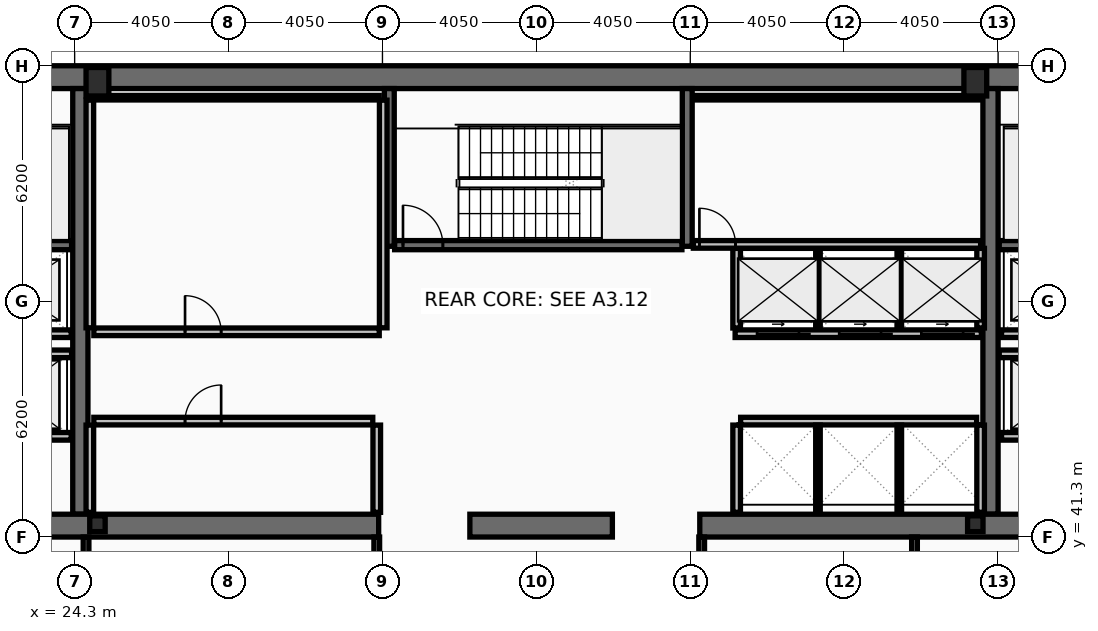
"""IFC4 building model, lengths in metres.
Left out: names, types, materials, properties, quantities, classifications, styles, units other than length and angle.
Written with IfcOpenShell. Run it as: python <this file> out.ifc"""

import sys

from ifc_helpers import new_model, si_unit, direction, frame, frame_2d, origin, origin_2d, place, context, subcontext, project, spatial, rectangle, hollow_rectangle, i_section, extrude, element, fill, save


model = new_model("IFC4")
c1 = context("Model", 3, precision=1e-05, world=origin(), true_north=direction((0.0, 1.0)))
c2 = subcontext(c1, "Body", "Model", "MODEL_VIEW")
j1 = project(units=[si_unit("LENGTHUNIT", "METRE"), si_unit("PLANEANGLEUNIT", "RADIAN")], contexts=[c1])
p1 = place(None, origin())
s1 = spatial("IfcSite", under=j1, at=p1, CompositionType="ELEMENT")
p2 = place(p1, origin())
s2 = spatial("IfcBuilding", under=s1, at=p2, CompositionType="ELEMENT")
p3 = place(p2, frame((0.0, 0.0, 257.0)))
s3 = spatial("IfcBuildingStorey", under=s2, at=p3, CompositionType="ELEMENT", Elevation=257.0)
p4 = place(p3, frame((16.2, 53.4, 0.0), z_axis=(0.0, 0.0, 1.0), x_axis=(1.0, 0.0, 0.0)))
e1 = element("IfcWall", 1, at=p4, inside=s3, PredefinedType="SHEAR", context=c2, shape_type="SweptSolid", body=[
    extrude(rectangle(XDim=40.5, YDim=0.6, at=frame_2d((20.25, 0.0))), origin(), (0.0, 0.0, 1.0), 4.64),
])
for number, where, z_axis, x_axis in (
    (2, (24.45, 41.9, 0.0), (0.0, 0.0, 1.0), (0.0, 1.0, 0.0)),
    (3, (48.4, 41.9, 0.0), (0.0, 0.0, 1.0), (0.0, 1.0, 0.0)),
):
    element("IfcWall", number, at=place(p3, frame(where, z_axis=z_axis, x_axis=x_axis)), inside=s3, PredefinedType="SHEAR", context=c2, shape_type="SweptSolid", body=[
        extrude(rectangle(XDim=11.2, YDim=0.4, at=frame_2d((5.6, 0.0))), origin(), (0.0, 0.0, 1.0), 4.64),
    ])
p5 = place(p3, frame((32.3, 41.6, 0.0), z_axis=(0.0, 0.0, 1.0), x_axis=(-1.0, 0.0, 0.0)))
e4 = element("IfcWall", 4, at=p5, inside=s3, PredefinedType="SHEAR", context=c2, shape_type="SweptSolid", body=[
    extrude(rectangle(XDim=11.45, YDim=0.6, at=frame_2d((5.725, 0.0))), origin(), (0.0, 0.0, 1.0), 4.64),
])
p6 = place(p3, frame((38.45, 41.6, 0.0), z_axis=(0.0, 0.0, 1.0), x_axis=(-1.0, 0.0, 0.0)))
e5 = element("IfcWall", 5, at=p6, inside=s3, PredefinedType="SHEAR", context=c2, shape_type="SweptSolid", body=[
    extrude(rectangle(XDim=3.75, YDim=0.6, at=frame_2d((1.875, 0.0))), origin(), (0.0, 0.0, 1.0), 4.64),
])
p7 = place(p3, frame((52.05, 41.6, 0.0), z_axis=(0.0, 0.0, 1.0), x_axis=(-1.0, 0.0, 0.0)))
e6 = element("IfcWall", 6, at=p7, inside=s3, PredefinedType="SHEAR", context=c2, shape_type="SweptSolid", body=[
    extrude(rectangle(XDim=11.3, YDim=0.6, at=frame_2d((5.65, 0.0))), origin(), (0.0, 0.0, 1.0), 4.64),
])
for number, where, z_axis, x_axis in (
    (7, (32.58, 48.95, 0.0), (0.0, 0.0, 1.0), (0.0, 1.0, 0.0)),
    (8, (40.42, 48.95, 0.0), (0.0, 0.0, 1.0), (0.0, 1.0, 0.0)),
):
    element("IfcWall", number, at=place(p3, frame(where, z_axis=z_axis, x_axis=x_axis)), inside=s3, PredefinedType="SHEAR", context=c2, shape_type="SweptSolid", body=[
        extrude(rectangle(XDim=4.15, YDim=0.26, at=frame_2d((2.075, 0.0))), origin(), (0.0, 0.0, 1.0), 4.64),
    ])
p8 = place(p3, frame((16.8, 48.98, 0.0), z_axis=(0.0, 0.0, 1.0), x_axis=(1.0, 0.0, 0.0)))
e9 = element("IfcWall", 9, at=p8, inside=s3, PredefinedType="SHEAR", context=c2, shape_type="SweptSolid", body=[
    extrude(rectangle(XDim=7.42, YDim=0.24, at=frame_2d((3.71, 0.0))), origin(), (0.0, 0.0, 1.0), 4.64),
])
p9 = place(p8, frame((0.22, 0.0, 0.0)))
e10 = element("IfcOpeningElement", 10, at=p9, cuts=e9, PredefinedType="OPENING", context=c2, shape_type="SweptSolid", body=[
    extrude(rectangle(XDim=1.05, YDim=2.15, at=frame_2d((0.525, 1.075))), frame((0.0, 0.13, 0.0), z_axis=(0.0, -1.0, 0.0), x_axis=(1.0, 0.0, 0.0)), (0.0, 0.0, 1.0), 0.26),
])
p10 = place(p3, frame((48.63, 48.98, 0.0), z_axis=(0.0, 0.0, 1.0), x_axis=(1.0, 0.0, 0.0)))
e11 = element("IfcWall", 11, at=p10, inside=s3, PredefinedType="SHEAR", context=c2, shape_type="SweptSolid", body=[
    extrude(rectangle(XDim=7.47, YDim=0.24, at=frame_2d((3.735, 0.0))), origin(), (0.0, 0.0, 1.0), 4.64),
])
p11 = place(p10, frame((6.2, 0.0, 0.0)))
e12 = element("IfcOpeningElement", 12, at=p11, cuts=e11, PredefinedType="OPENING", context=c2, shape_type="SweptSolid", body=[
    extrude(rectangle(XDim=1.05, YDim=2.15, at=frame_2d((0.525, 1.075))), frame((0.0, 0.13, 0.0), z_axis=(0.0, -1.0, 0.0), x_axis=(1.0, 0.0, 0.0)), (0.0, 0.0, 1.0), 0.26),
])
p12 = place(p3, frame((32.72, 48.98, 0.0), z_axis=(0.0, 0.0, 1.0), x_axis=(1.0, 0.0, 0.0)))
e13 = element("IfcWall", 13, at=p12, inside=s3, PredefinedType="SHEAR", context=c2, shape_type="SweptSolid", body=[
    extrude(rectangle(XDim=7.56, YDim=0.24, at=frame_2d((3.78, 0.0))), origin(), (0.0, 0.0, 1.0), 4.64),
])
p13 = place(p12, frame((0.22, 0.0, 0.0)))
e14 = element("IfcOpeningElement", 14, at=p13, cuts=e13, PredefinedType="OPENING", context=c2, shape_type="SweptSolid", body=[
    extrude(rectangle(XDim=1.05, YDim=2.15, at=frame_2d((0.525, 1.075))), frame((0.0, 0.13, 0.0), z_axis=(0.0, -1.0, 0.0), x_axis=(1.0, 0.0, 0.0)), (0.0, 0.0, 1.0), 0.26),
])
for number, where, z_axis, x_axis in (
    (15, (24.9, 53.28, 0.0), (0.0, 0.0, 1.0), (1.0, 0.0, 0.0)),
    (16, (48.0, 53.28, 0.0), (0.0, 0.0, 1.0), (1.0, 0.0, 0.0)),
):
    element("IfcColumn", number, at=place(p3, frame(where, z_axis=z_axis, x_axis=x_axis)), inside=s3, PredefinedType="COLUMN", context=c2, shape_type="SweptSolid", body=[
        extrude(hollow_rectangle(XDim=0.6, YDim=0.75, WallThickness=0.045, at=origin_2d()), origin(), (0.0, 0.0, 1.0), 4.8),
    ])
for number, where, z_axis, x_axis in (
    (17, (24.9, 41.65, 0.0), (0.0, 0.0, 1.0), (1.0, 0.0, 0.0)),
    (18, (48.0, 41.65, 0.0), (0.0, 0.0, 1.0), (1.0, 0.0, 0.0)),
):
    element("IfcColumn", number, at=place(p3, frame(where, z_axis=z_axis, x_axis=x_axis)), inside=s3, PredefinedType="COLUMN", context=c2, shape_type="SweptSolid", body=[
        extrude(i_section(OverallWidth=0.406, OverallDepth=0.416, WebThickness=0.03, FlangeThickness=0.048, at=origin_2d()), origin(), (0.0, 0.0, 1.0), 4.8),
    ])
p14 = place(p3, frame((51.61, 43.95, 0.0), z_axis=(0.0, 0.0, 1.0), x_axis=(-1.0, 0.0, 0.0)))
e19 = element("IfcWall", 19, at=p14, inside=s3, PredefinedType="PARTITIONING", context=c2, shape_type="SweptSolid", body=[
    extrude(rectangle(XDim=2.92, YDim=0.2, at=frame_2d((1.46, 0.0))), origin(), (0.0, 0.0, 1.0), 4.64),
])
p15 = place(p14, frame((0.81, 0.0, 0.0)))
e20 = element("IfcOpeningElement", 20, at=p15, cuts=e19, PredefinedType="OPENING", context=c2, shape_type="SweptSolid", body=[
    extrude(rectangle(XDim=1.3, YDim=2.18, at=frame_2d((0.65, 1.09))), frame((0.0, 0.11, 0.0), z_axis=(0.0, -1.0, 0.0), x_axis=(1.0, 0.0, 0.0)), (0.0, 0.0, 1.0), 0.22),
])
p16 = place(p3, frame((24.21, 43.95, 0.0), z_axis=(0.0, 0.0, 1.0), x_axis=(-1.0, 0.0, 0.0)))
e21 = element("IfcWall", 21, at=p16, inside=s3, PredefinedType="PARTITIONING", context=c2, shape_type="SweptSolid", body=[
    extrude(rectangle(XDim=2.97, YDim=0.2, at=frame_2d((1.485, 0.0))), origin(), (0.0, 0.0, 1.0), 4.64),
])
p17 = place(p16, frame((0.86, 0.0, 0.0)))
e22 = element("IfcOpeningElement", 22, at=p17, cuts=e21, PredefinedType="OPENING", context=c2, shape_type="SweptSolid", body=[
    extrude(rectangle(XDim=1.3, YDim=2.18, at=frame_2d((0.65, 1.09))), frame((0.0, 0.11, 0.0), z_axis=(0.0, -1.0, 0.0), x_axis=(1.0, 0.0, 0.0)), (0.0, 0.0, 1.0), 0.22),
])
p18 = place(p3, frame((51.61, 46.65, 0.0), z_axis=(0.0, 0.0, 1.0), x_axis=(-1.0, 0.0, 0.0)))
e23 = element("IfcWall", 23, at=p18, inside=s3, PredefinedType="PARTITIONING", context=c2, shape_type="SweptSolid", body=[
    extrude(rectangle(XDim=2.92, YDim=0.2, at=frame_2d((1.46, 0.0))), origin(), (0.0, 0.0, 1.0), 4.64),
])
p19 = place(p18, frame((0.86, 0.0, 0.0)))
e24 = element("IfcOpeningElement", 24, at=p19, cuts=e23, PredefinedType="OPENING", context=c2, shape_type="SweptSolid", body=[
    extrude(rectangle(XDim=1.2, YDim=2.18, at=frame_2d((0.6, 1.09))), frame((0.0, 0.11, 0.0), z_axis=(0.0, -1.0, 0.0), x_axis=(1.0, 0.0, 0.0)), (0.0, 0.0, 1.0), 0.22),
])
p20 = place(p3, frame((24.21, 46.65, 0.0), z_axis=(0.0, 0.0, 1.0), x_axis=(-1.0, 0.0, 0.0)))
e25 = element("IfcWall", 25, at=p20, inside=s3, PredefinedType="PARTITIONING", context=c2, shape_type="SweptSolid", body=[
    extrude(rectangle(XDim=2.97, YDim=0.2, at=frame_2d((1.485, 0.0))), origin(), (0.0, 0.0, 1.0), 4.64),
])
p21 = place(p20, frame((0.91, 0.0, 0.0)))
e26 = element("IfcOpeningElement", 26, at=p21, cuts=e25, PredefinedType="OPENING", context=c2, shape_type="SweptSolid", body=[
    extrude(rectangle(XDim=1.2, YDim=2.18, at=frame_2d((0.6, 1.09))), frame((0.0, 0.11, 0.0), z_axis=(0.0, -1.0, 0.0), x_axis=(1.0, 0.0, 0.0)), (0.0, 0.0, 1.0), 0.22),
])
p22 = place(p3, frame((48.16, 46.65, 0.0), z_axis=(0.0, 0.0, 1.0), x_axis=(-1.0, 0.0, 0.0)))
e27 = element("IfcWall", 27, at=p22, inside=s3, PredefinedType="PARTITIONING", context=c2, shape_type="SweptSolid", body=[
    extrude(rectangle(XDim=6.48, YDim=0.2, at=frame_2d((3.24, 0.0))), origin(), (0.0, 0.0, 1.0), 4.64),
])
p23 = place(p22, frame((4.8, 0.0, 0.0)))
e28 = element("IfcOpeningElement", 28, at=p23, cuts=e27, PredefinedType="OPENING", context=c2, shape_type="SweptSolid", body=[
    extrude(rectangle(XDim=1.1, YDim=2.18, at=frame_2d((0.55, 1.09))), frame((0.0, 0.11, 0.0), z_axis=(0.0, -1.0, 0.0), x_axis=(1.0, 0.0, 0.0)), (0.0, 0.0, 1.0), 0.22),
])
p24 = place(p22, frame((2.64, 0.0, 0.0)))
e29 = element("IfcOpeningElement", 29, at=p24, cuts=e27, PredefinedType="OPENING", context=c2, shape_type="SweptSolid", body=[
    extrude(rectangle(XDim=1.1, YDim=2.18, at=frame_2d((0.55, 1.09))), frame((0.0, 0.11, 0.0), z_axis=(0.0, -1.0, 0.0), x_axis=(1.0, 0.0, 0.0)), (0.0, 0.0, 1.0), 0.22),
])
p25 = place(p22, frame((0.48, 0.0, 0.0)))
e30 = element("IfcOpeningElement", 30, at=p25, cuts=e27, PredefinedType="OPENING", context=c2, shape_type="SweptSolid", body=[
    extrude(rectangle(XDim=1.1, YDim=2.18, at=frame_2d((0.55, 1.09))), frame((0.0, 0.11, 0.0), z_axis=(0.0, -1.0, 0.0), x_axis=(1.0, 0.0, 0.0)), (0.0, 0.0, 1.0), 0.22),
])
p26 = place(p3, frame((21.2, 46.12, 0.0), z_axis=(0.0, 0.0, 1.0), x_axis=(1.0, 0.0, 0.0)))
e31 = element("IfcWall", 31, at=p26, inside=s3, PredefinedType="PARTITIONING", context=c2, shape_type="SweptSolid", body=[
    extrude(rectangle(XDim=3.02, YDim=0.2, at=frame_2d((1.51, 0.0))), origin(), (0.0, 0.0, 1.0), 4.64),
])
p27 = place(p3, frame((48.63, 46.12, 0.0), z_axis=(0.0, 0.0, 1.0), x_axis=(1.0, 0.0, 0.0)))
e32 = element("IfcWall", 32, at=p27, inside=s3, PredefinedType="PARTITIONING", context=c2, shape_type="SweptSolid", body=[
    extrude(rectangle(XDim=3.07, YDim=0.2, at=frame_2d((1.535, 0.0))), origin(), (0.0, 0.0, 1.0), 4.64),
])
for number, where, z_axis, x_axis in (
    (33, (24.7, 46.805, 0.0), (0.0, 0.0, 1.0), (0.0, 1.0, 0.0)),
    (34, (32.42, 46.805, 0.0), (0.0, 0.0, 1.0), (0.0, 1.0, 0.0)),
):
    element("IfcWall", number, at=place(p3, frame(where, z_axis=z_axis, x_axis=x_axis)), inside=s3, PredefinedType="PARTITIONING", context=c2, shape_type="SweptSolid", body=[
        extrude(rectangle(XDim=5.99, YDim=0.2, at=frame_2d((2.995, 0.0))), origin(), (0.0, 0.0, 1.0), 4.64),
    ])
p28 = place(p3, frame((24.805, 52.86, 0.0), z_axis=(0.0, 0.0, 1.0), x_axis=(1.0, 0.0, 0.0)))
e35 = element("IfcWall", 35, at=p28, inside=s3, PredefinedType="PARTITIONING", context=c2, shape_type="SweptSolid", body=[
    extrude(rectangle(XDim=7.51, YDim=0.12, at=frame_2d((3.755, 0.0))), origin(), (0.0, 0.0, 1.0), 4.64),
])
p29 = place(p3, frame((24.805, 46.7, 0.0), z_axis=(0.0, 0.0, 1.0), x_axis=(1.0, 0.0, 0.0)))
e36 = element("IfcWall", 36, at=p29, inside=s3, PredefinedType="PARTITIONING", context=c2, shape_type="SweptSolid", body=[
    extrude(rectangle(XDim=7.51, YDim=0.2, at=frame_2d((3.755, 0.0))), origin(), (0.0, 0.0, 1.0), 4.64),
])
p30 = place(p29, frame((2.4, 0.0, 0.0)))
e37 = element("IfcOpeningElement", 37, at=p30, cuts=e36, PredefinedType="OPENING", context=c2, shape_type="SweptSolid", body=[
    extrude(rectangle(XDim=0.95, YDim=2.1, at=frame_2d((0.475, 1.05))), frame((0.0, 0.11, 0.0), z_axis=(0.0, -1.0, 0.0), x_axis=(1.0, 0.0, 0.0)), (0.0, 0.0, 1.0), 0.22),
])
for number, where, z_axis, x_axis in (
    (38, (24.7, 41.95, 0.0), (0.0, 0.0, 1.0), (0.0, 1.0, 0.0)),
    (39, (32.25, 41.95, 0.0), (0.0, 0.0, 1.0), (0.0, 1.0, 0.0)),
):
    element("IfcWall", number, at=place(p3, frame(where, z_axis=z_axis, x_axis=x_axis)), inside=s3, PredefinedType="PARTITIONING", context=c2, shape_type="SweptSolid", body=[
        extrude(rectangle(XDim=2.295, YDim=0.2, at=frame_2d((1.147, 0.0))), origin(), (0.0, 0.0, 1.0), 4.64),
    ])
p31 = place(p3, frame((24.805, 44.35, 0.0), z_axis=(0.0, 0.0, 1.0), x_axis=(1.0, 0.0, 0.0)))
e40 = element("IfcWall", 40, at=p31, inside=s3, PredefinedType="PARTITIONING", context=c2, shape_type="SweptSolid", body=[
    extrude(rectangle(XDim=7.34, YDim=0.2, at=frame_2d((3.67, 0.0))), origin(), (0.0, 0.0, 1.0), 4.64),
])
p32 = place(p31, frame((2.4, 0.0, 0.0)))
e41 = element("IfcOpeningElement", 41, at=p32, cuts=e40, PredefinedType="OPENING", context=c2, shape_type="SweptSolid", body=[
    extrude(rectangle(XDim=0.95, YDim=2.1, at=frame_2d((0.475, 1.05))), frame((0.0, 0.11, 0.0), z_axis=(0.0, -1.0, 0.0), x_axis=(1.0, 0.0, 0.0)), (0.0, 0.0, 1.0), 0.22),
])
for number, where, z_axis, x_axis in (
    (42, (41.72, 46.8, 0.0), (0.0, 0.0, 1.0), (0.0, 1.0, 0.0)),
    (43, (48.14, 46.8, 0.0), (0.0, 0.0, 1.0), (0.0, 1.0, 0.0)),
):
    element("IfcWall", number, at=place(p3, frame(where, z_axis=z_axis, x_axis=x_axis)), inside=s3, PredefinedType="PARTITIONING", context=c2, shape_type="SweptSolid", body=[
        extrude(rectangle(XDim=2.095, YDim=0.2, at=frame_2d((1.047, 0.0))), origin(), (0.0, 0.0, 1.0), 4.64),
    ])
for number, where, z_axis, x_axis in (
    (44, (43.86, 46.8, 0.0), (0.0, 0.0, 1.0), (0.0, 1.0, 0.0)),
    (45, (46.0, 46.8, 0.0), (0.0, 0.0, 1.0), (0.0, 1.0, 0.0)),
):
    element("IfcWall", number, at=place(p3, frame(where, z_axis=z_axis, x_axis=x_axis)), inside=s3, PredefinedType="PARTITIONING", context=c2, shape_type="SweptSolid", body=[
        extrude(rectangle(XDim=2.095, YDim=0.12, at=frame_2d((1.047, 0.0))), origin(), (0.0, 0.0, 1.0), 4.64),
    ])
p33 = place(p3, frame((41.825, 44.35, 0.0), z_axis=(0.0, 0.0, 1.0), x_axis=(1.0, 0.0, 0.0)))
e46 = element("IfcWall", 46, at=p33, inside=s3, PredefinedType="PARTITIONING", context=c2, shape_type="SweptSolid", body=[
    extrude(rectangle(XDim=6.21, YDim=0.2, at=frame_2d((3.105, 0.0))), origin(), (0.0, 0.0, 1.0), 4.64),
])
for number, where, z_axis, x_axis in (
    (47, (41.72, 41.95, 0.0), (0.0, 0.0, 1.0), (0.0, 1.0, 0.0)),
    (48, (48.14, 41.95, 0.0), (0.0, 0.0, 1.0), (0.0, 1.0, 0.0)),
):
    element("IfcWall", number, at=place(p3, frame(where, z_axis=z_axis, x_axis=x_axis)), inside=s3, PredefinedType="PARTITIONING", context=c2, shape_type="SweptSolid", body=[
        extrude(rectangle(XDim=2.295, YDim=0.2, at=frame_2d((1.147, 0.0))), origin(), (0.0, 0.0, 1.0), 4.64),
    ])
for number, where, z_axis, x_axis in (
    (49, (43.86, 41.95, 0.0), (0.0, 0.0, 1.0), (0.0, 1.0, 0.0)),
    (50, (46.0, 41.95, 0.0), (0.0, 0.0, 1.0), (0.0, 1.0, 0.0)),
):
    element("IfcWall", number, at=place(p3, frame(where, z_axis=z_axis, x_axis=x_axis)), inside=s3, PredefinedType="PARTITIONING", context=c2, shape_type="SweptSolid", body=[
        extrude(rectangle(XDim=2.295, YDim=0.12, at=frame_2d((1.147, 0.0))), origin(), (0.0, 0.0, 1.0), 4.64),
    ])
p34 = place(p3, frame((40.58, 52.86, 0.0), z_axis=(0.0, 0.0, 1.0), x_axis=(1.0, 0.0, 0.0)))
e51 = element("IfcWall", 51, at=p34, inside=s3, PredefinedType="PARTITIONING", context=c2, shape_type="SweptSolid", body=[
    extrude(rectangle(XDim=7.56, YDim=0.12, at=frame_2d((3.78, 0.0))), origin(), (0.0, 0.0, 1.0), 4.64),
])
p35 = place(p3, frame((40.58, 49.0, 0.0), z_axis=(0.0, 0.0, 1.0), x_axis=(1.0, 0.0, 0.0)))
e52 = element("IfcWall", 52, at=p35, inside=s3, PredefinedType="PARTITIONING", context=c2, shape_type="SweptSolid", body=[
    extrude(rectangle(XDim=7.56, YDim=0.2, at=frame_2d((3.78, 0.0))), origin(), (0.0, 0.0, 1.0), 4.64),
])
p36 = place(p35, frame((0.16, 0.0, 0.0)))
e53 = element("IfcOpeningElement", 53, at=p36, cuts=e52, PredefinedType="OPENING", context=c2, shape_type="SweptSolid", body=[
    extrude(rectangle(XDim=0.95, YDim=2.1, at=frame_2d((0.475, 1.05))), frame((0.0, 0.11, 0.0), z_axis=(0.0, -1.0, 0.0), x_axis=(1.0, 0.0, 0.0)), (0.0, 0.0, 1.0), 0.22),
])
p37 = place(p3, frame((24.6, 38.28, 0.0), z_axis=(0.0, 0.0, 1.0), x_axis=(0.0, 1.0, 0.0)))
e54 = element("IfcWall", 54, at=p37, inside=s3, PredefinedType="PARTITIONING", context=c2, shape_type="SweptSolid", body=[
    extrude(rectangle(XDim=3.02, YDim=0.15, at=frame_2d((1.51, 0.0))), origin(), (0.0, 0.0, 1.0), 3.98),
])
for number, where, z_axis, x_axis in (
    (55, (32.25, 38.28, 0.0), (0.0, 0.0, 1.0), (0.0, 1.0, 0.0)),
    (56, (40.8, 38.28, 0.0), (0.0, 0.0, 1.0), (0.0, 1.0, 0.0)),
    (57, (46.4, 38.28, 0.0), (0.0, 0.0, 1.0), (0.0, 1.0, 0.0)),
):
    element("IfcWall", number, at=place(p3, frame(where, z_axis=z_axis, x_axis=x_axis)), inside=s3, PredefinedType="PARTITIONING", context=c2, shape_type="SweptSolid", body=[
        extrude(rectangle(XDim=3.02, YDim=0.15, at=frame_2d((1.51, 0.0))), origin(), (0.0, 0.0, 1.0), 4.64),
    ])
p38 = place(p13, origin())
e58 = element("IfcDoor", 58, at=p38, inside=s3, OperationType="SINGLE_SWING_LEFT", PredefinedType="DOOR", context=c2, shape_type="SweptSolid", body=[
    extrude(rectangle(XDim=1.05, YDim=2.15, at=frame_2d((0.525, 1.075))), frame((0.0, 0.025, 0.0), z_axis=(0.0, -1.0, 0.0), x_axis=(1.0, 0.0, 0.0)), (0.0, 0.0, 1.0), 0.05),
])
fill(e14, e58)
p39 = place(p23, origin())
e59 = element("IfcDoor", 59, at=p39, inside=s3, OperationType="SLIDING_TO_LEFT", PredefinedType="DOOR", context=c2, shape_type="SweptSolid", body=[
    extrude(rectangle(XDim=1.1, YDim=2.18, at=frame_2d((0.55, 1.09))), frame((0.0, 0.025, 0.0), z_axis=(0.0, -1.0, 0.0), x_axis=(1.0, 0.0, 0.0)), (0.0, 0.0, 1.0), 0.05),
])
fill(e28, e59)
p40 = place(p24, origin())
e60 = element("IfcDoor", 60, at=p40, inside=s3, OperationType="SLIDING_TO_LEFT", PredefinedType="DOOR", context=c2, shape_type="SweptSolid", body=[
    extrude(rectangle(XDim=1.1, YDim=2.18, at=frame_2d((0.55, 1.09))), frame((0.0, 0.025, 0.0), z_axis=(0.0, -1.0, 0.0), x_axis=(1.0, 0.0, 0.0)), (0.0, 0.0, 1.0), 0.05),
])
fill(e29, e60)
p41 = place(p25, origin())
e61 = element("IfcDoor", 61, at=p41, inside=s3, OperationType="SLIDING_TO_LEFT", PredefinedType="DOOR", context=c2, shape_type="SweptSolid", body=[
    extrude(rectangle(XDim=1.1, YDim=2.18, at=frame_2d((0.55, 1.09))), frame((0.0, 0.025, 0.0), z_axis=(0.0, -1.0, 0.0), x_axis=(1.0, 0.0, 0.0)), (0.0, 0.0, 1.0), 0.05),
])
fill(e30, e61)
p42 = place(p30, origin())
e62 = element("IfcDoor", 62, at=p42, inside=s3, OperationType="SINGLE_SWING_LEFT", PredefinedType="DOOR", context=c2, shape_type="SweptSolid", body=[
    extrude(rectangle(XDim=0.95, YDim=2.1, at=frame_2d((0.475, 1.05))), frame((0.0, 0.025, 0.0), z_axis=(0.0, -1.0, 0.0), x_axis=(1.0, 0.0, 0.0)), (0.0, 0.0, 1.0), 0.05),
])
fill(e37, e62)
p43 = place(p32, origin())
e63 = element("IfcDoor", 63, at=p43, inside=s3, OperationType="SINGLE_SWING_RIGHT", PredefinedType="DOOR", context=c2, shape_type="SweptSolid", body=[
    extrude(rectangle(XDim=0.95, YDim=2.1, at=frame_2d((0.475, 1.05))), frame((0.0, 0.025, 0.0), z_axis=(0.0, -1.0, 0.0), x_axis=(1.0, 0.0, 0.0)), (0.0, 0.0, 1.0), 0.05),
])
fill(e41, e63)
p44 = place(p36, origin())
e64 = element("IfcDoor", 64, at=p44, inside=s3, OperationType="SINGLE_SWING_LEFT", PredefinedType="DOOR", context=c2, shape_type="SweptSolid", body=[
    extrude(rectangle(XDim=0.95, YDim=2.1, at=frame_2d((0.475, 1.05))), frame((0.0, 0.025, 0.0), z_axis=(0.0, -1.0, 0.0), x_axis=(1.0, 0.0, 0.0)), (0.0, 0.0, 1.0), 0.05),
])
fill(e53, e64)
save(model, sys.argv[1])
